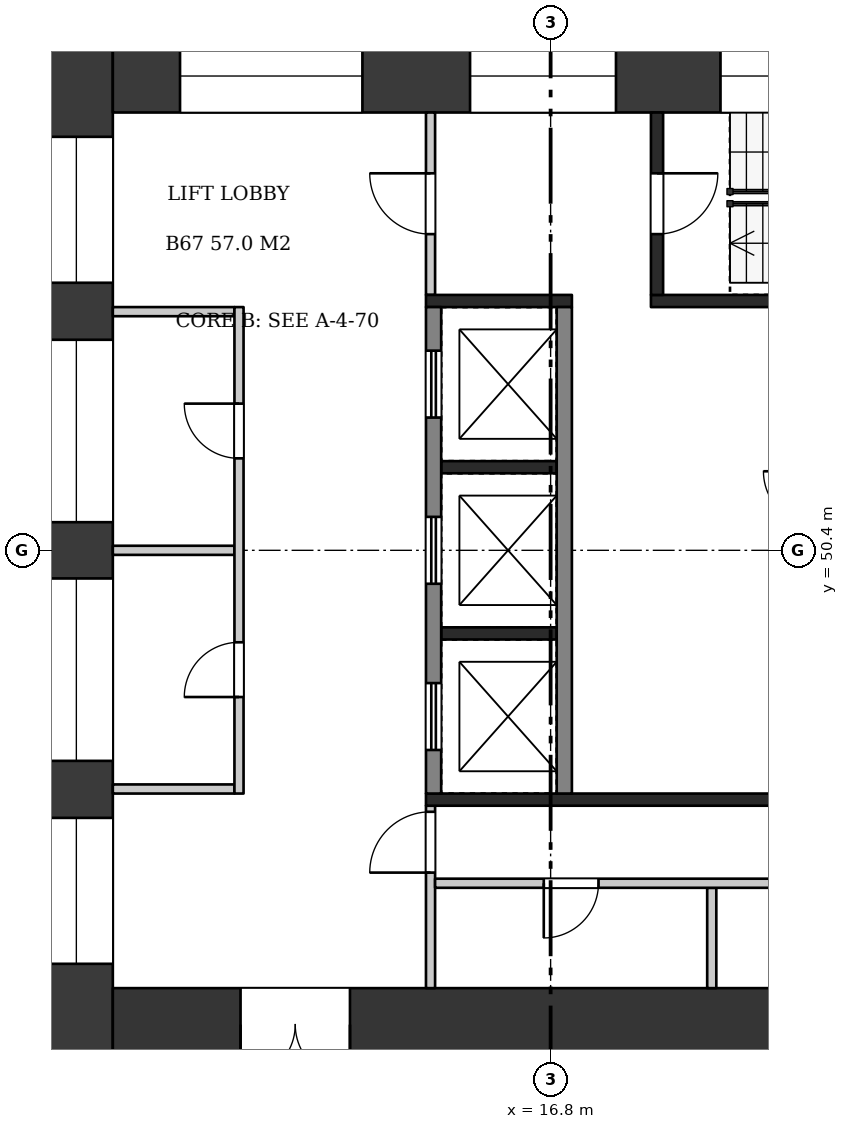
"""IFC4 building model, lengths in metres.
Left out: names, types, materials, properties, quantities, classifications, styles, units other than length and angle.
Written with IfcOpenShell. Run it as: python <this file> out.ifc"""

import sys

from ifc_helpers import new_model, si_unit, direction, frame, frame_2d, origin, place, context, subcontext, project, spatial, rectangle, extrude, element, fill, save


model = new_model("IFC4")
c1 = context("Model", 3, precision=1e-05, world=origin(), true_north=direction((0.0, 1.0)))
c2 = subcontext(c1, "Body", "Model", "MODEL_VIEW")
j1 = project(units=[si_unit("LENGTHUNIT", "METRE"), si_unit("PLANEANGLEUNIT", "RADIAN")], contexts=[c1])
p1 = place(None, origin())
s1 = spatial("IfcSite", under=j1, at=p1, CompositionType="ELEMENT")
p2 = place(p1, origin())
s2 = spatial("IfcBuilding", under=s1, at=p2, CompositionType="ELEMENT")
p3 = place(p2, frame((0.0, 0.0, 256.2)))
s3 = spatial("IfcBuildingStorey", under=s2, at=p3, CompositionType="ELEMENT", Elevation=256.2)
p4 = place(p3, frame((9.0, 58.8, 0.0), z_axis=(0.0, 0.0, 1.0), x_axis=(0.0, -1.0, 0.0)))
e1 = element("IfcWall", 1, at=p4, inside=s3, PredefinedType="SHEAR", context=c2, shape_type="SweptSolid", body=[
    extrude(rectangle(XDim=16.8, YDim=1.2, at=frame_2d((8.4, 0.0))), origin(), (0.0, 0.0, 1.0), 3.22),
])
p5 = place(p4, frame((1.6, 0.0, 0.6)))
e2 = element("IfcOpeningElement", 2, at=p5, cuts=e1, PredefinedType="OPENING", context=c2, shape_type="SweptSolid", body=[
    extrude(rectangle(XDim=2.4, YDim=2.1, at=frame_2d((1.2, 1.05))), frame((0.0, 0.61, 0.0), z_axis=(0.0, -1.0, 0.0), x_axis=(1.0, 0.0, 0.0)), (0.0, 0.0, 1.0), 1.22),
])
p6 = place(p4, frame((4.938, 0.0, 1.6)))
e3 = element("IfcOpeningElement", 3, at=p6, cuts=e1, PredefinedType="OPENING", context=c2, shape_type="SweptSolid", body=[
    extrude(rectangle(XDim=3.0, YDim=1.2, at=frame_2d((1.5, 0.6))), frame((0.0, 0.61, 0.0), z_axis=(0.0, -1.0, 0.0), x_axis=(1.0, 0.0, 0.0)), (0.0, 0.0, 1.0), 1.22),
])
p7 = place(p4, frame((8.863, 0.0, 1.6)))
e4 = element("IfcOpeningElement", 4, at=p7, cuts=e1, PredefinedType="OPENING", context=c2, shape_type="SweptSolid", body=[
    extrude(rectangle(XDim=3.0, YDim=1.2, at=frame_2d((1.5, 0.6))), frame((0.0, 0.61, 0.0), z_axis=(0.0, -1.0, 0.0), x_axis=(1.0, 0.0, 0.0)), (0.0, 0.0, 1.0), 1.22),
])
p8 = place(p4, frame((12.8, 0.0, 0.6)))
e5 = element("IfcOpeningElement", 5, at=p8, cuts=e1, PredefinedType="OPENING", context=c2, shape_type="SweptSolid", body=[
    extrude(rectangle(XDim=2.4, YDim=2.1, at=frame_2d((1.2, 1.05))), frame((0.0, 0.61, 0.0), z_axis=(0.0, -1.0, 0.0), x_axis=(1.0, 0.0, 0.0)), (0.0, 0.0, 1.0), 1.22),
])
p9 = place(p3, frame((9.6, 58.2, 0.0), z_axis=(0.0, 0.0, 1.0), x_axis=(1.0, 0.0, 0.0)))
e6 = element("IfcWall", 6, at=p9, inside=s3, PredefinedType="SHEAR", context=c2, shape_type="SweptSolid", body=[
    extrude(rectangle(XDim=14.4, YDim=1.2, at=frame_2d((7.2, 0.0))), origin(), (0.0, 0.0, 1.0), 3.22),
])
p10 = place(p9, frame((1.105, 0.0, 0.6)))
e7 = element("IfcOpeningElement", 7, at=p10, cuts=e6, PredefinedType="OPENING", context=c2, shape_type="SweptSolid", body=[
    extrude(rectangle(XDim=3.0, YDim=2.1, at=frame_2d((1.5, 1.05))), frame((0.0, 0.61, 0.0), z_axis=(0.0, -1.0, 0.0), x_axis=(1.0, 0.0, 0.0)), (0.0, 0.0, 1.0), 1.22),
])
p11 = place(p9, frame((5.875, 0.0, 0.6)))
e8 = element("IfcOpeningElement", 8, at=p11, cuts=e6, PredefinedType="OPENING", context=c2, shape_type="SweptSolid", body=[
    extrude(rectangle(XDim=2.4, YDim=2.1, at=frame_2d((1.2, 1.05))), frame((0.0, 0.61, 0.0), z_axis=(0.0, -1.0, 0.0), x_axis=(1.0, 0.0, 0.0)), (0.0, 0.0, 1.0), 1.22),
])
p12 = place(p9, frame((9.993, 0.0, 0.5)))
e9 = element("IfcOpeningElement", 9, at=p12, cuts=e6, PredefinedType="OPENING", context=c2, shape_type="SweptSolid", body=[
    extrude(rectangle(XDim=1.2, YDim=2.4, at=frame_2d((0.6, 1.2))), frame((0.0, 0.61, 0.0), z_axis=(0.0, -1.0, 0.0), x_axis=(1.0, 0.0, 0.0)), (0.0, 0.0, 1.0), 1.22),
])
p13 = place(p9, frame((12.197, 0.0, 0.5)))
e10 = element("IfcOpeningElement", 10, at=p13, cuts=e6, PredefinedType="OPENING", context=c2, shape_type="SweptSolid", body=[
    extrude(rectangle(XDim=1.2, YDim=2.4, at=frame_2d((0.6, 1.2))), frame((0.0, 0.61, 0.0), z_axis=(0.0, -1.0, 0.0), x_axis=(1.0, 0.0, 0.0)), (0.0, 0.0, 1.0), 1.22),
])
p14 = place(p3, frame((9.6, 42.6, 0.0), z_axis=(0.0, 0.0, 1.0), x_axis=(1.0, 0.0, 0.0)))
e11 = element("IfcWall", 11, at=p14, inside=s3, PredefinedType="SHEAR", context=c2, shape_type="SweptSolid", body=[
    extrude(rectangle(XDim=14.4, YDim=1.2, at=frame_2d((7.2, 0.0))), origin(), (0.0, 0.0, 1.0), 3.22),
])
p15 = place(p14, frame((2.1, 0.0, 0.0)))
e12 = element("IfcOpeningElement", 12, at=p15, cuts=e11, PredefinedType="OPENING", context=c2, shape_type="SweptSolid", body=[
    extrude(rectangle(XDim=1.8, YDim=2.1, at=frame_2d((0.9, 1.05))), frame((0.0, 0.61, 0.0), z_axis=(0.0, -1.0, 0.0), x_axis=(1.0, 0.0, 0.0)), (0.0, 0.0, 1.0), 1.22),
])
for number, where, z_axis, x_axis in (
    (13, (9.6, 54.325, 0.0), (0.0, 0.0, 1.0), (1.0, 0.0, 0.0)),
    (14, (9.6, 46.475, 0.0), (0.0, 0.0, 1.0), (1.0, 0.0, 0.0)),
    (15, (9.6, 50.4, 0.0), (0.0, 0.0, 1.0), (1.0, 0.0, 0.0)),
):
    element("IfcWall", number, at=place(p3, frame(where, z_axis=z_axis, x_axis=x_axis)), inside=s3, PredefinedType="PARTITIONING", context=c2, shape_type="SweptSolid", body=[
        extrude(rectangle(XDim=2.0, YDim=0.15, at=frame_2d((1.0, 0.0))), origin(), (0.0, 0.0, 1.0), 3.22),
    ])
p16 = place(p3, frame((11.675, 54.4, 0.0), z_axis=(0.0, 0.0, 1.0), x_axis=(0.0, -1.0, 0.0)))
e16 = element("IfcWall", 16, at=p16, inside=s3, PredefinedType="PARTITIONING", context=c2, shape_type="SweptSolid", body=[
    extrude(rectangle(XDim=8.0, YDim=0.15, at=frame_2d((4.0, 0.0))), origin(), (0.0, 0.0, 1.0), 3.22),
])
p17 = place(p16, frame((1.587, 0.0, 0.0)))
e17 = element("IfcOpeningElement", 17, at=p17, cuts=e16, PredefinedType="OPENING", context=c2, shape_type="SweptSolid", body=[
    extrude(rectangle(XDim=0.9, YDim=2.1, at=frame_2d((0.45, 1.05))), frame((0.0, 0.085, 0.0), z_axis=(0.0, -1.0, 0.0), x_axis=(1.0, 0.0, 0.0)), (0.0, 0.0, 1.0), 0.17),
])
p18 = place(p16, frame((5.512, 0.0, 0.0)))
e18 = element("IfcOpeningElement", 18, at=p18, cuts=e16, PredefinedType="OPENING", context=c2, shape_type="SweptSolid", body=[
    extrude(rectangle(XDim=0.9, YDim=2.1, at=frame_2d((0.45, 1.05))), frame((0.0, 0.085, 0.0), z_axis=(0.0, -1.0, 0.0), x_axis=(1.0, 0.0, 0.0)), (0.0, 0.0, 1.0), 0.17),
])
for number, where, z_axis, x_axis in (
    (19, (15.0, 51.767, 0.0), (0.0, 0.0, 1.0), (1.0, 0.0, 0.0)),
    (20, (15.0, 49.033, 0.0), (0.0, 0.0, 1.0), (1.0, 0.0, 0.0)),
):
    element("IfcWall", number, at=place(p3, frame(where, z_axis=z_axis, x_axis=x_axis)), inside=s3, PredefinedType="SHEAR", context=c2, shape_type="SweptSolid", body=[
        extrude(rectangle(XDim=1.9, YDim=0.2, at=frame_2d((0.95, 0.0))), origin(), (0.0, 0.0, 1.0), 3.22),
    ])
p19 = place(p3, frame((14.875, 54.4, 0.0), z_axis=(0.0, 0.0, 1.0), x_axis=(0.0, -1.0, 0.0)))
e21 = element("IfcWall", 21, at=p19, inside=s3, PredefinedType="SHEAR", context=c2, shape_type="SweptSolid", body=[
    extrude(rectangle(XDim=8.0, YDim=0.25, at=frame_2d((4.0, 0.0))), origin(), (0.0, 0.0, 1.0), 3.22),
])
p20 = place(p19, frame((0.717, 0.0, 0.0)))
e22 = element("IfcOpeningElement", 22, at=p20, cuts=e21, PredefinedType="OPENING", context=c2, shape_type="SweptSolid", body=[
    extrude(rectangle(XDim=1.1, YDim=2.1, at=frame_2d((0.55, 1.05))), frame((0.0, 0.135, 0.0), z_axis=(0.0, -1.0, 0.0), x_axis=(1.0, 0.0, 0.0)), (0.0, 0.0, 1.0), 0.27),
])
p21 = place(p19, frame((3.45, 0.0, 0.0)))
e23 = element("IfcOpeningElement", 23, at=p21, cuts=e21, PredefinedType="OPENING", context=c2, shape_type="SweptSolid", body=[
    extrude(rectangle(XDim=1.1, YDim=2.1, at=frame_2d((0.55, 1.05))), frame((0.0, 0.135, 0.0), z_axis=(0.0, -1.0, 0.0), x_axis=(1.0, 0.0, 0.0)), (0.0, 0.0, 1.0), 0.27),
])
p22 = place(p19, frame((6.183, 0.0, 0.0)))
e24 = element("IfcOpeningElement", 24, at=p22, cuts=e21, PredefinedType="OPENING", context=c2, shape_type="SweptSolid", body=[
    extrude(rectangle(XDim=1.1, YDim=2.1, at=frame_2d((0.55, 1.05))), frame((0.0, 0.135, 0.0), z_axis=(0.0, -1.0, 0.0), x_axis=(1.0, 0.0, 0.0)), (0.0, 0.0, 1.0), 0.27),
])
p23 = place(p3, frame((17.025, 54.4, 0.0), z_axis=(0.0, 0.0, 1.0), x_axis=(0.0, -1.0, 0.0)))
e25 = element("IfcWall", 25, at=p23, inside=s3, PredefinedType="SHEAR", context=c2, shape_type="SweptSolid", body=[
    extrude(rectangle(XDim=8.0, YDim=0.25, at=frame_2d((4.0, 0.0))), origin(), (0.0, 0.0, 1.0), 3.22),
])
p24 = place(p3, frame((14.75, 54.5, 0.0), z_axis=(0.0, 0.0, 1.0), x_axis=(1.0, 0.0, 0.0)))
e26 = element("IfcWall", 26, at=p24, inside=s3, PredefinedType="SHEAR", context=c2, shape_type="SweptSolid", body=[
    extrude(rectangle(XDim=2.4, YDim=0.2, at=frame_2d((1.2, 0.0))), origin(), (0.0, 0.0, 1.0), 3.22),
])
p25 = place(p3, frame((18.45, 54.5, 0.0), z_axis=(0.0, 0.0, 1.0), x_axis=(1.0, 0.0, 0.0)))
e27 = element("IfcWall", 27, at=p25, inside=s3, PredefinedType="SHEAR", context=c2, shape_type="SweptSolid", body=[
    extrude(rectangle(XDim=5.55, YDim=0.2, at=frame_2d((2.775, 0.0))), origin(), (0.0, 0.0, 1.0), 3.22),
])
p26 = place(p3, frame((14.825, 57.6, 0.0), z_axis=(0.0, 0.0, 1.0), x_axis=(0.0, -1.0, 0.0)))
e28 = element("IfcWall", 28, at=p26, inside=s3, PredefinedType="PARTITIONING", context=c2, shape_type="SweptSolid", body=[
    extrude(rectangle(XDim=3.0, YDim=0.15, at=frame_2d((1.5, 0.0))), origin(), (0.0, 0.0, 1.0), 3.22),
])
p27 = place(p26, frame((1.0, 0.0, 0.0)))
e29 = element("IfcOpeningElement", 29, at=p27, cuts=e28, PredefinedType="OPENING", context=c2, shape_type="SweptSolid", body=[
    extrude(rectangle(XDim=1.0, YDim=2.1, at=frame_2d((0.5, 1.05))), frame((0.0, 0.085, 0.0), z_axis=(0.0, -1.0, 0.0), x_axis=(1.0, 0.0, 0.0)), (0.0, 0.0, 1.0), 0.17),
])
p28 = place(p3, frame((18.55, 57.6, 0.0), z_axis=(0.0, 0.0, 1.0), x_axis=(0.0, -1.0, 0.0)))
e30 = element("IfcWall", 30, at=p28, inside=s3, PredefinedType="SHEAR", context=c2, shape_type="SweptSolid", body=[
    extrude(rectangle(XDim=3.0, YDim=0.2, at=frame_2d((1.5, 0.0))), origin(), (0.0, 0.0, 1.0), 3.22),
])
p29 = place(p28, frame((1.0, 0.0, 0.0)))
e31 = element("IfcOpeningElement", 31, at=p29, cuts=e30, PredefinedType="OPENING", context=c2, shape_type="SweptSolid", body=[
    extrude(rectangle(XDim=1.0, YDim=2.1, at=frame_2d((0.5, 1.05))), frame((0.0, 0.11, 0.0), z_axis=(0.0, -1.0, 0.0), x_axis=(1.0, 0.0, 0.0)), (0.0, 0.0, 1.0), 0.22),
])
p30 = place(p3, frame((14.75, 46.3, 0.0), z_axis=(0.0, 0.0, 1.0), x_axis=(1.0, 0.0, 0.0)))
e32 = element("IfcWall", 32, at=p30, inside=s3, PredefinedType="SHEAR", context=c2, shape_type="SweptSolid", body=[
    extrude(rectangle(XDim=9.25, YDim=0.2, at=frame_2d((4.625, 0.0))), origin(), (0.0, 0.0, 1.0), 3.22),
])
p31 = place(p3, frame((14.825, 46.2, 0.0), z_axis=(0.0, 0.0, 1.0), x_axis=(0.0, -1.0, 0.0)))
e33 = element("IfcWall", 33, at=p31, inside=s3, PredefinedType="PARTITIONING", context=c2, shape_type="SweptSolid", body=[
    extrude(rectangle(XDim=3.0, YDim=0.15, at=frame_2d((1.5, 0.0))), origin(), (0.0, 0.0, 1.0), 3.22),
])
p32 = place(p31, frame((0.1, 0.0, 0.0)))
e34 = element("IfcOpeningElement", 34, at=p32, cuts=e33, PredefinedType="OPENING", context=c2, shape_type="SweptSolid", body=[
    extrude(rectangle(XDim=1.0, YDim=2.1, at=frame_2d((0.5, 1.05))), frame((0.0, 0.085, 0.0), z_axis=(0.0, -1.0, 0.0), x_axis=(1.0, 0.0, 0.0)), (0.0, 0.0, 1.0), 0.17),
])
p33 = place(p3, frame((19.45, 44.85, 0.0), z_axis=(0.0, 0.0, 1.0), x_axis=(0.0, -1.0, 0.0)))
e35 = element("IfcWall", 35, at=p33, inside=s3, PredefinedType="PARTITIONING", context=c2, shape_type="SweptSolid", body=[
    extrude(rectangle(XDim=1.65, YDim=0.15, at=frame_2d((0.825, 0.0))), origin(), (0.0, 0.0, 1.0), 3.22),
])
p34 = place(p3, frame((14.9, 44.925, 0.0), z_axis=(0.0, 0.0, 1.0), x_axis=(1.0, 0.0, 0.0)))
e36 = element("IfcWall", 36, at=p34, inside=s3, PredefinedType="PARTITIONING", context=c2, shape_type="SweptSolid", body=[
    extrude(rectangle(XDim=9.1, YDim=0.15, at=frame_2d((4.55, 0.0))), origin(), (0.0, 0.0, 1.0), 3.22),
])
p35 = place(p34, frame((1.788, 0.0, 0.0)))
e37 = element("IfcOpeningElement", 37, at=p35, cuts=e36, PredefinedType="OPENING", context=c2, shape_type="SweptSolid", body=[
    extrude(rectangle(XDim=0.9, YDim=2.1, at=frame_2d((0.45, 1.05))), frame((0.0, 0.085, 0.0), z_axis=(0.0, -1.0, 0.0), x_axis=(1.0, 0.0, 0.0)), (0.0, 0.0, 1.0), 0.17),
])
p36 = place(p34, frame((6.413, 0.0, 0.0)))
e38 = element("IfcOpeningElement", 38, at=p36, cuts=e36, PredefinedType="OPENING", context=c2, shape_type="SweptSolid", body=[
    extrude(rectangle(XDim=0.9, YDim=2.1, at=frame_2d((0.45, 1.05))), frame((0.0, 0.085, 0.0), z_axis=(0.0, -1.0, 0.0), x_axis=(1.0, 0.0, 0.0)), (0.0, 0.0, 1.0), 0.17),
])
p37 = place(p15, frame((1.8, 0.0, 0.0), z_axis=(0.0, 0.0, 1.0), x_axis=(-1.0, 0.0, 0.0)))
e39 = element("IfcDoor", 39, at=p37, inside=s3, OperationType="DOUBLE_DOOR_SINGLE_SWING", PredefinedType="DOOR", context=c2, shape_type="SweptSolid", body=[
    extrude(rectangle(XDim=1.8, YDim=2.1, at=frame_2d((0.9, 1.05))), frame((0.0, 0.025, 0.0), z_axis=(0.0, -1.0, 0.0), x_axis=(1.0, 0.0, 0.0)), (0.0, 0.0, 1.0), 0.05),
])
fill(e12, e39)
p38 = place(p17, frame((0.9, 0.0, 0.0), z_axis=(0.0, 0.0, 1.0), x_axis=(-1.0, 0.0, 0.0)))
e40 = element("IfcDoor", 40, at=p38, inside=s3, OperationType="SINGLE_SWING_RIGHT", PredefinedType="DOOR", context=c2, shape_type="SweptSolid", body=[
    extrude(rectangle(XDim=0.9, YDim=2.1, at=frame_2d((0.45, 1.05))), frame((0.0, 0.025, 0.0), z_axis=(0.0, -1.0, 0.0), x_axis=(1.0, 0.0, 0.0)), (0.0, 0.0, 1.0), 0.05),
])
fill(e17, e40)
p39 = place(p18, frame((0.9, 0.0, 0.0), z_axis=(0.0, 0.0, 1.0), x_axis=(-1.0, 0.0, 0.0)))
e41 = element("IfcDoor", 41, at=p39, inside=s3, OperationType="SINGLE_SWING_LEFT", PredefinedType="DOOR", context=c2, shape_type="SweptSolid", body=[
    extrude(rectangle(XDim=0.9, YDim=2.1, at=frame_2d((0.45, 1.05))), frame((0.0, 0.025, 0.0), z_axis=(0.0, -1.0, 0.0), x_axis=(1.0, 0.0, 0.0)), (0.0, 0.0, 1.0), 0.05),
])
fill(e18, e41)
p40 = place(p20, origin())
e42 = element("IfcDoor", 42, at=p40, inside=s3, OperationType="DOUBLE_DOOR_SLIDING", PredefinedType="DOOR", context=c2, shape_type="SweptSolid", body=[
    extrude(rectangle(XDim=1.1, YDim=2.1, at=frame_2d((0.55, 1.05))), frame((0.0, 0.025, 0.0), z_axis=(0.0, -1.0, 0.0), x_axis=(1.0, 0.0, 0.0)), (0.0, 0.0, 1.0), 0.05),
])
fill(e22, e42)
p41 = place(p21, origin())
e43 = element("IfcDoor", 43, at=p41, inside=s3, OperationType="DOUBLE_DOOR_SLIDING", PredefinedType="DOOR", context=c2, shape_type="SweptSolid", body=[
    extrude(rectangle(XDim=1.1, YDim=2.1, at=frame_2d((0.55, 1.05))), frame((0.0, 0.025, 0.0), z_axis=(0.0, -1.0, 0.0), x_axis=(1.0, 0.0, 0.0)), (0.0, 0.0, 1.0), 0.05),
])
fill(e23, e43)
p42 = place(p22, origin())
e44 = element("IfcDoor", 44, at=p42, inside=s3, OperationType="DOUBLE_DOOR_SLIDING", PredefinedType="DOOR", context=c2, shape_type="SweptSolid", body=[
    extrude(rectangle(XDim=1.1, YDim=2.1, at=frame_2d((0.55, 1.05))), frame((0.0, 0.025, 0.0), z_axis=(0.0, -1.0, 0.0), x_axis=(1.0, 0.0, 0.0)), (0.0, 0.0, 1.0), 0.05),
])
fill(e24, e44)
p43 = place(p27, frame((1.0, 0.0, 0.0), z_axis=(0.0, 0.0, 1.0), x_axis=(-1.0, 0.0, 0.0)))
e45 = element("IfcDoor", 45, at=p43, inside=s3, OperationType="SINGLE_SWING_RIGHT", PredefinedType="DOOR", context=c2, shape_type="SweptSolid", body=[
    extrude(rectangle(XDim=1.0, YDim=2.1, at=frame_2d((0.5, 1.05))), frame((0.0, 0.025, 0.0), z_axis=(0.0, -1.0, 0.0), x_axis=(1.0, 0.0, 0.0)), (0.0, 0.0, 1.0), 0.05),
])
fill(e29, e45)
p44 = place(p29, origin())
e46 = element("IfcDoor", 46, at=p44, inside=s3, OperationType="SINGLE_SWING_LEFT", PredefinedType="DOOR", context=c2, shape_type="SweptSolid", body=[
    extrude(rectangle(XDim=1.0, YDim=2.1, at=frame_2d((0.5, 1.05))), frame((0.0, 0.025, 0.0), z_axis=(0.0, -1.0, 0.0), x_axis=(1.0, 0.0, 0.0)), (0.0, 0.0, 1.0), 0.05),
])
fill(e31, e46)
p45 = place(p32, frame((1.0, 0.0, 0.0), z_axis=(0.0, 0.0, 1.0), x_axis=(-1.0, 0.0, 0.0)))
e47 = element("IfcDoor", 47, at=p45, inside=s3, OperationType="SINGLE_SWING_LEFT", PredefinedType="DOOR", context=c2, shape_type="SweptSolid", body=[
    extrude(rectangle(XDim=1.0, YDim=2.1, at=frame_2d((0.5, 1.05))), frame((0.0, 0.025, 0.0), z_axis=(0.0, -1.0, 0.0), x_axis=(1.0, 0.0, 0.0)), (0.0, 0.0, 1.0), 0.05),
])
fill(e34, e47)
p46 = place(p35, frame((0.9, 0.0, 0.0), z_axis=(0.0, 0.0, 1.0), x_axis=(-1.0, 0.0, 0.0)))
e48 = element("IfcDoor", 48, at=p46, inside=s3, OperationType="SINGLE_SWING_RIGHT", PredefinedType="DOOR", context=c2, shape_type="SweptSolid", body=[
    extrude(rectangle(XDim=0.9, YDim=2.1, at=frame_2d((0.45, 1.05))), frame((0.0, 0.025, 0.0), z_axis=(0.0, -1.0, 0.0), x_axis=(1.0, 0.0, 0.0)), (0.0, 0.0, 1.0), 0.05),
])
fill(e37, e48)
p47 = place(p5, origin())
e49 = element("IfcWindow", 49, at=p47, inside=s3, PartitioningType="SINGLE_PANEL", PredefinedType="WINDOW", context=c2, shape_type="SweptSolid", body=[
    extrude(rectangle(XDim=2.4, YDim=2.1, at=frame_2d((1.2, 1.05))), frame((0.0, 0.03, 0.0), z_axis=(0.0, -1.0, 0.0), x_axis=(1.0, 0.0, 0.0)), (0.0, 0.0, 1.0), 0.06),
])
fill(e2, e49)
p48 = place(p6, origin())
e50 = element("IfcWindow", 50, at=p48, inside=s3, PartitioningType="SINGLE_PANEL", PredefinedType="WINDOW", context=c2, shape_type="SweptSolid", body=[
    extrude(rectangle(XDim=3.0, YDim=1.2, at=frame_2d((1.5, 0.6))), frame((0.0, 0.03, 0.0), z_axis=(0.0, -1.0, 0.0), x_axis=(1.0, 0.0, 0.0)), (0.0, 0.0, 1.0), 0.06),
])
fill(e3, e50)
p49 = place(p7, origin())
e51 = element("IfcWindow", 51, at=p49, inside=s3, PartitioningType="SINGLE_PANEL", PredefinedType="WINDOW", context=c2, shape_type="SweptSolid", body=[
    extrude(rectangle(XDim=3.0, YDim=1.2, at=frame_2d((1.5, 0.6))), frame((0.0, 0.03, 0.0), z_axis=(0.0, -1.0, 0.0), x_axis=(1.0, 0.0, 0.0)), (0.0, 0.0, 1.0), 0.06),
])
fill(e4, e51)
p50 = place(p8, origin())
e52 = element("IfcWindow", 52, at=p50, inside=s3, PartitioningType="SINGLE_PANEL", PredefinedType="WINDOW", context=c2, shape_type="SweptSolid", body=[
    extrude(rectangle(XDim=2.4, YDim=2.1, at=frame_2d((1.2, 1.05))), frame((0.0, 0.03, 0.0), z_axis=(0.0, -1.0, 0.0), x_axis=(1.0, 0.0, 0.0)), (0.0, 0.0, 1.0), 0.06),
])
fill(e5, e52)
p51 = place(p10, origin())
e53 = element("IfcWindow", 53, at=p51, inside=s3, PartitioningType="SINGLE_PANEL", PredefinedType="WINDOW", context=c2, shape_type="SweptSolid", body=[
    extrude(rectangle(XDim=3.0, YDim=2.1, at=frame_2d((1.5, 1.05))), frame((0.0, 0.03, 0.0), z_axis=(0.0, -1.0, 0.0), x_axis=(1.0, 0.0, 0.0)), (0.0, 0.0, 1.0), 0.06),
])
fill(e7, e53)
p52 = place(p11, origin())
e54 = element("IfcWindow", 54, at=p52, inside=s3, PartitioningType="SINGLE_PANEL", PredefinedType="WINDOW", context=c2, shape_type="SweptSolid", body=[
    extrude(rectangle(XDim=2.4, YDim=2.1, at=frame_2d((1.2, 1.05))), frame((0.0, 0.03, 0.0), z_axis=(0.0, -1.0, 0.0), x_axis=(1.0, 0.0, 0.0)), (0.0, 0.0, 1.0), 0.06),
])
fill(e8, e54)
p53 = place(p12, origin())
e55 = element("IfcWindow", 55, at=p53, inside=s3, PartitioningType="SINGLE_PANEL", PredefinedType="WINDOW", context=c2, shape_type="SweptSolid", body=[
    extrude(rectangle(XDim=1.2, YDim=2.4, at=frame_2d((0.6, 1.2))), frame((0.0, 0.03, 0.0), z_axis=(0.0, -1.0, 0.0), x_axis=(1.0, 0.0, 0.0)), (0.0, 0.0, 1.0), 0.06),
])
fill(e9, e55)
save(model, sys.argv[1])
